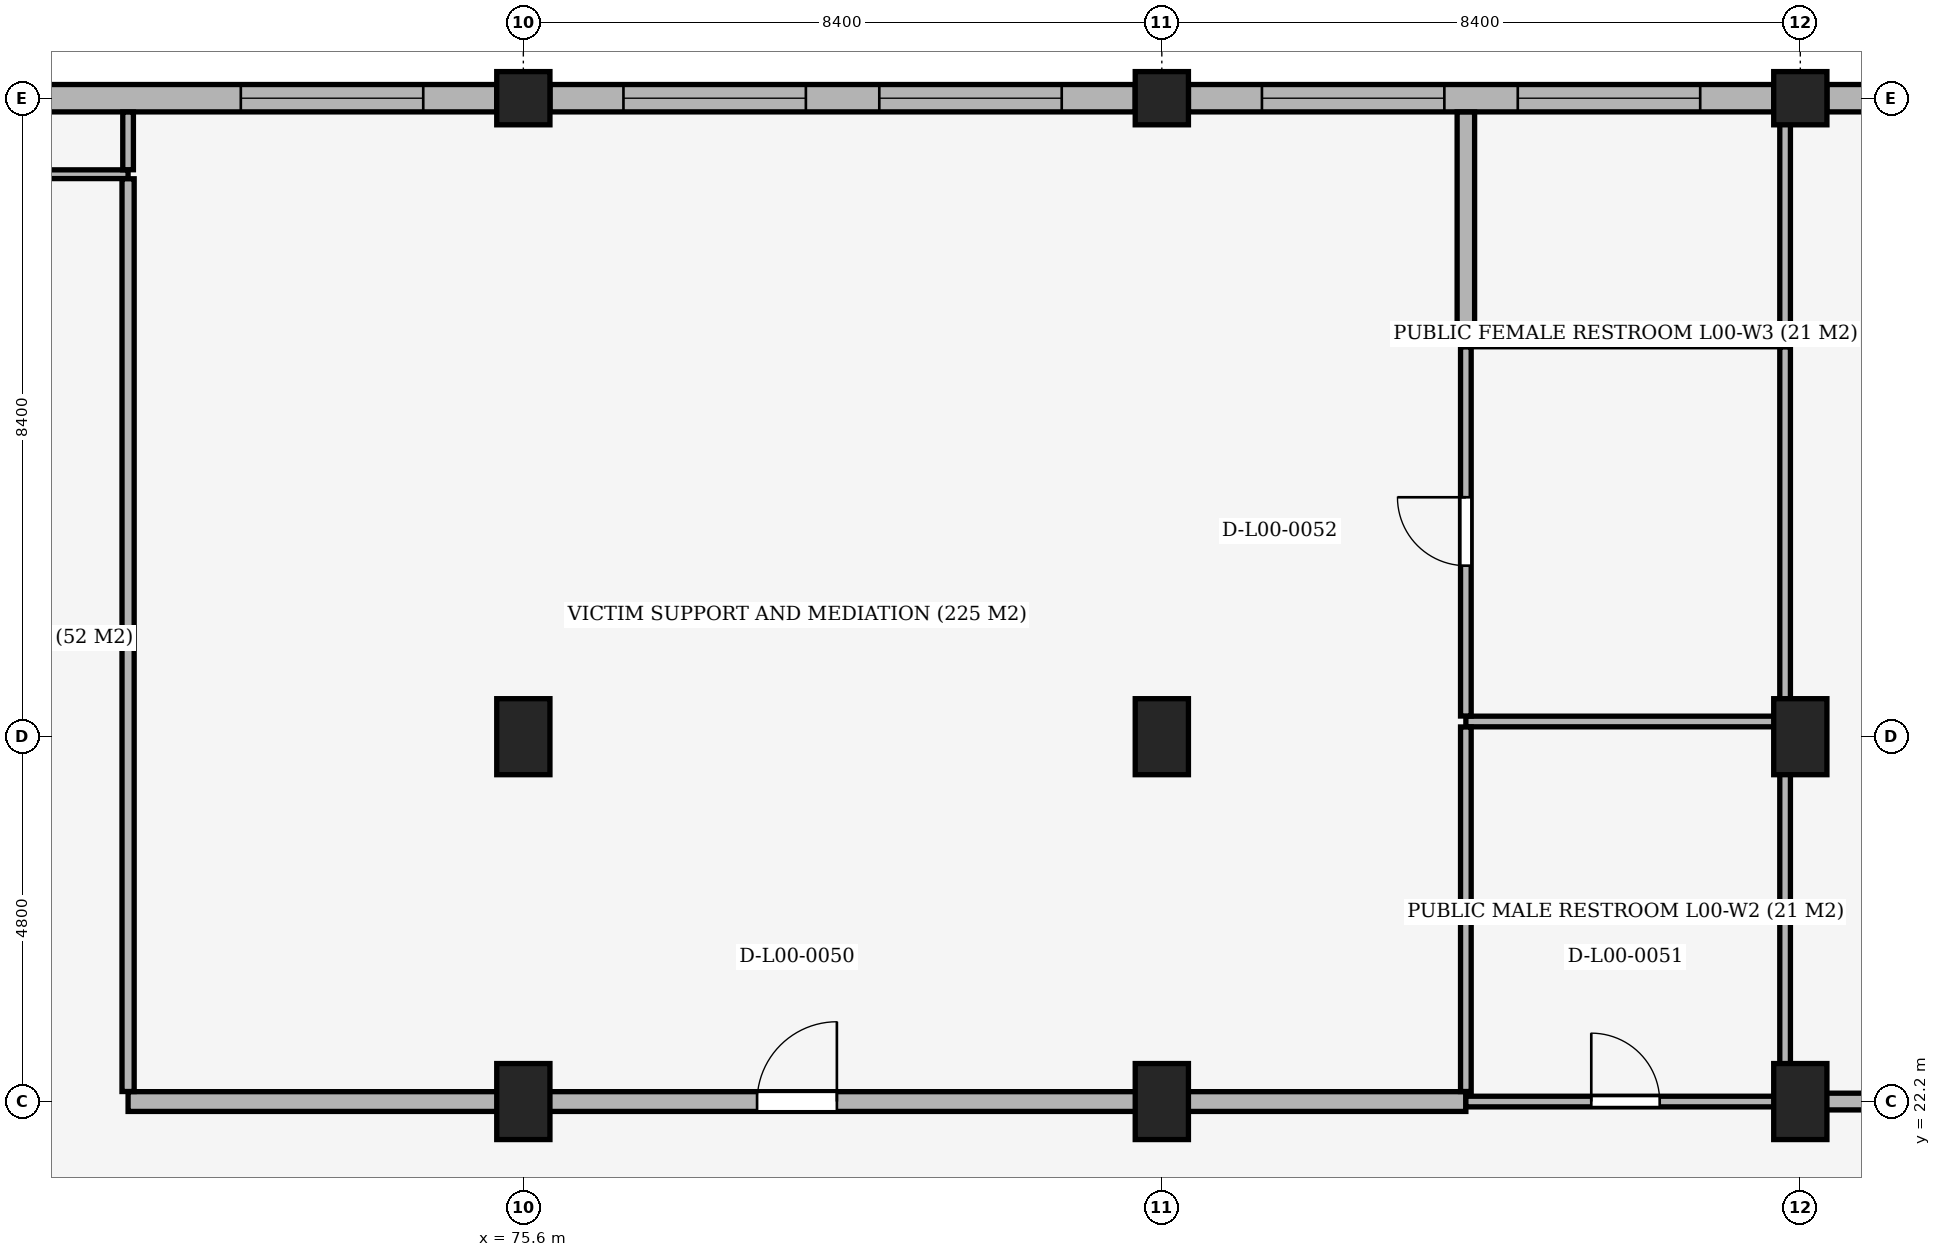
"""IFC4 building model, lengths in metres.
Left out: names, types, materials, properties, quantities, classifications, styles, units other than length and angle.
Written with IfcOpenShell. Run it as: python <this file> out.ifc"""

import sys

from ifc_helpers import new_model, si_unit, direction, frame, frame_2d, origin, origin_2d, place, context, subcontext, project, spatial, rectangle, extrude, element, fill, save


model = new_model("IFC4")
c1 = context("Model", 3, precision=1e-05, world=origin(), true_north=direction((0.0, 1.0)))
c2 = subcontext(c1, "Body", "Model", "MODEL_VIEW")
j1 = project(units=[si_unit("LENGTHUNIT", "METRE"), si_unit("PLANEANGLEUNIT", "RADIAN")], contexts=[c1])
p1 = place(None, origin())
s1 = spatial("IfcSite", under=j1, at=p1, CompositionType="ELEMENT")
p2 = place(p1, origin())
s2 = spatial("IfcBuilding", under=s1, at=p2, CompositionType="ELEMENT")
p3 = place(p2, origin())
s3 = spatial("IfcBuildingStorey", under=s2, at=p3, CompositionType="ELEMENT", Elevation=0.0)
for number, where, z_axis, x_axis in (
    (1, (75.6, 22.2, 0.0), (0.0, 0.0, 1.0), (1.0, 0.0, 0.0)),
    (2, (75.6, 27.0, 0.0), (0.0, 0.0, 1.0), (1.0, 0.0, 0.0)),
):
    element("IfcColumn", number, at=place(p3, frame(where, z_axis=z_axis, x_axis=x_axis)), inside=s3, PredefinedType="COLUMN", context=c2, shape_type="SweptSolid", body=[
        extrude(rectangle(XDim=0.7, YDim=1.0, at=origin_2d()), origin(), (0.0, 0.0, 1.0), 5.1),
    ])
p4 = place(p3, frame((75.6, 35.4, 0.0), z_axis=(0.0, 0.0, 1.0), x_axis=(1.0, 0.0, 0.0)))
e3 = element("IfcColumn", 3, at=p4, inside=s3, PredefinedType="COLUMN", context=c2, shape_type="SweptSolid", body=[
    extrude(rectangle(XDim=0.7, YDim=0.7, at=origin_2d()), origin(), (0.0, 0.0, 1.0), 5.1),
])
for number, where, z_axis, x_axis in (
    (4, (84.0, 22.2, 0.0), (0.0, 0.0, 1.0), (1.0, 0.0, 0.0)),
    (5, (84.0, 27.0, 0.0), (0.0, 0.0, 1.0), (1.0, 0.0, 0.0)),
):
    element("IfcColumn", number, at=place(p3, frame(where, z_axis=z_axis, x_axis=x_axis)), inside=s3, PredefinedType="COLUMN", context=c2, shape_type="SweptSolid", body=[
        extrude(rectangle(XDim=0.7, YDim=1.0, at=origin_2d()), origin(), (0.0, 0.0, 1.0), 5.1),
    ])
p5 = place(p3, frame((84.0, 35.4, 0.0), z_axis=(0.0, 0.0, 1.0), x_axis=(1.0, 0.0, 0.0)))
e6 = element("IfcColumn", 6, at=p5, inside=s3, PredefinedType="COLUMN", context=c2, shape_type="SweptSolid", body=[
    extrude(rectangle(XDim=0.7, YDim=0.7, at=origin_2d()), origin(), (0.0, 0.0, 1.0), 5.1),
])
for number, where, z_axis, x_axis in (
    (7, (92.4, 22.2, 0.0), (0.0, 0.0, 1.0), (1.0, 0.0, 0.0)),
    (8, (92.4, 27.0, 0.0), (0.0, 0.0, 1.0), (1.0, 0.0, 0.0)),
):
    element("IfcColumn", number, at=place(p3, frame(where, z_axis=z_axis, x_axis=x_axis)), inside=s3, PredefinedType="COLUMN", context=c2, shape_type="SweptSolid", body=[
        extrude(rectangle(XDim=0.7, YDim=1.0, at=origin_2d()), origin(), (0.0, 0.0, 1.0), 5.1),
    ])
p6 = place(p3, frame((92.4, 35.4, 0.0), z_axis=(0.0, 0.0, 1.0), x_axis=(1.0, 0.0, 0.0)))
e9 = element("IfcColumn", 9, at=p6, inside=s3, PredefinedType="COLUMN", context=c2, shape_type="SweptSolid", body=[
    extrude(rectangle(XDim=0.7, YDim=0.7, at=origin_2d()), origin(), (0.0, 0.0, 1.0), 5.1),
])
p7 = place(p3, frame((67.55, 35.4, 0.0), z_axis=(0.0, 0.0, 1.0), x_axis=(1.0, 0.0, 0.0)))
e10 = element("IfcWall", 10, at=p7, inside=s3, PredefinedType="SOLIDWALL", context=c2, shape_type="SweptSolid", body=[
    extrude(rectangle(XDim=7.7, YDim=0.36, at=frame_2d((3.85, 0.0))), origin(), (0.0, 0.0, 1.0), 4.07),
])
p8 = place(p7, frame((4.333, 0.0, 0.85)))
e11 = element("IfcOpeningElement", 11, at=p8, cuts=e10, PredefinedType="OPENING", context=c2, shape_type="SweptSolid", body=[
    extrude(rectangle(XDim=2.4, YDim=2.4, at=frame_2d((1.2, 1.2))), frame((0.0, 0.195, 0.0), z_axis=(0.0, -1.0, 0.0), x_axis=(1.0, 0.0, 0.0)), (0.0, 0.0, 1.0), 0.39),
])
p9 = place(p3, frame((75.95, 35.4, 0.0), z_axis=(0.0, 0.0, 1.0), x_axis=(1.0, 0.0, 0.0)))
e12 = element("IfcWall", 12, at=p9, inside=s3, PredefinedType="SOLIDWALL", context=c2, shape_type="SweptSolid", body=[
    extrude(rectangle(XDim=7.7, YDim=0.36, at=frame_2d((3.85, 0.0))), origin(), (0.0, 0.0, 1.0), 4.07),
])
p10 = place(p9, frame((0.967, 0.0, 0.85)))
e13 = element("IfcOpeningElement", 13, at=p10, cuts=e12, PredefinedType="OPENING", context=c2, shape_type="SweptSolid", body=[
    extrude(rectangle(XDim=2.4, YDim=2.4, at=frame_2d((1.2, 1.2))), frame((0.0, 0.195, 0.0), z_axis=(0.0, -1.0, 0.0), x_axis=(1.0, 0.0, 0.0)), (0.0, 0.0, 1.0), 0.39),
])
p11 = place(p9, frame((4.333, 0.0, 0.85)))
e14 = element("IfcOpeningElement", 14, at=p11, cuts=e12, PredefinedType="OPENING", context=c2, shape_type="SweptSolid", body=[
    extrude(rectangle(XDim=2.4, YDim=2.4, at=frame_2d((1.2, 1.2))), frame((0.0, 0.195, 0.0), z_axis=(0.0, -1.0, 0.0), x_axis=(1.0, 0.0, 0.0)), (0.0, 0.0, 1.0), 0.39),
])
p12 = place(p3, frame((84.35, 35.4, 0.0), z_axis=(0.0, 0.0, 1.0), x_axis=(1.0, 0.0, 0.0)))
e15 = element("IfcWall", 15, at=p12, inside=s3, PredefinedType="SOLIDWALL", context=c2, shape_type="SweptSolid", body=[
    extrude(rectangle(XDim=7.7, YDim=0.36, at=frame_2d((3.85, 0.0))), origin(), (0.0, 0.0, 1.0), 4.07),
])
p13 = place(p12, frame((0.967, 0.0, 0.85)))
e16 = element("IfcOpeningElement", 16, at=p13, cuts=e15, PredefinedType="OPENING", context=c2, shape_type="SweptSolid", body=[
    extrude(rectangle(XDim=2.4, YDim=2.4, at=frame_2d((1.2, 1.2))), frame((0.0, 0.195, 0.0), z_axis=(0.0, -1.0, 0.0), x_axis=(1.0, 0.0, 0.0)), (0.0, 0.0, 1.0), 0.39),
])
p14 = place(p12, frame((4.333, 0.0, 0.85)))
e17 = element("IfcOpeningElement", 17, at=p14, cuts=e15, PredefinedType="OPENING", context=c2, shape_type="SweptSolid", body=[
    extrude(rectangle(XDim=2.4, YDim=2.4, at=frame_2d((1.2, 1.2))), frame((0.0, 0.195, 0.0), z_axis=(0.0, -1.0, 0.0), x_axis=(1.0, 0.0, 0.0)), (0.0, 0.0, 1.0), 0.39),
])
p15 = place(p3, frame((92.75, 35.4, 0.0), z_axis=(0.0, 0.0, 1.0), x_axis=(1.0, 0.0, 0.0)))
e18 = element("IfcWall", 18, at=p15, inside=s3, PredefinedType="SOLIDWALL", context=c2, shape_type="SweptSolid", body=[
    extrude(rectangle(XDim=7.7, YDim=0.36, at=frame_2d((3.85, 0.0))), origin(), (0.0, 0.0, 1.0), 4.07),
])
p16 = place(p15, frame((0.967, 0.0, 0.85)))
e19 = element("IfcOpeningElement", 19, at=p16, cuts=e18, PredefinedType="OPENING", context=c2, shape_type="SweptSolid", body=[
    extrude(rectangle(XDim=2.4, YDim=2.4, at=frame_2d((1.2, 1.2))), frame((0.0, 0.195, 0.0), z_axis=(0.0, -1.0, 0.0), x_axis=(1.0, 0.0, 0.0)), (0.0, 0.0, 1.0), 0.39),
])
p17 = place(p15, frame((4.333, 0.0, 0.85)))
e20 = element("IfcOpeningElement", 20, at=p17, cuts=e18, PredefinedType="OPENING", context=c2, shape_type="SweptSolid", body=[
    extrude(rectangle(XDim=2.4, YDim=2.4, at=frame_2d((1.2, 1.2))), frame((0.0, 0.195, 0.0), z_axis=(0.0, -1.0, 0.0), x_axis=(1.0, 0.0, 0.0)), (0.0, 0.0, 1.0), 0.39),
])
p18 = place(p3, frame((70.4, 22.2, 0.0), z_axis=(0.0, 0.0, 1.0), x_axis=(1.0, 0.0, 0.0)))
e21 = element("IfcWall", 21, at=p18, inside=s3, PredefinedType="PARTITIONING", context=c2, shape_type="SweptSolid", body=[
    extrude(rectangle(XDim=17.6, YDim=0.26, at=frame_2d((8.8, 0.0))), origin(), (0.0, 0.0, 1.0), 4.07),
])
p19 = place(p18, frame((8.275, 0.0, 0.0)))
e22 = element("IfcOpeningElement", 22, at=p19, cuts=e21, PredefinedType="OPENING", context=c2, shape_type="SweptSolid", body=[
    extrude(rectangle(XDim=1.05, YDim=2.1, at=frame_2d((0.525, 1.05))), frame((0.0, 0.145, 0.0), z_axis=(0.0, -1.0, 0.0), x_axis=(1.0, 0.0, 0.0)), (0.0, 0.0, 1.0), 0.29),
])
p20 = place(p3, frame((88.0, 22.2, 0.0), z_axis=(0.0, 0.0, 1.0), x_axis=(1.0, 0.0, 0.0)))
e23 = element("IfcWall", 23, at=p20, inside=s3, PredefinedType="PARTITIONING", context=c2, shape_type="SweptSolid", body=[
    extrude(rectangle(XDim=4.2, YDim=0.14, at=frame_2d((2.1, 0.0))), origin(), (0.0, 0.0, 1.0), 4.07),
])
p21 = place(p20, frame((1.65, 0.0, 0.0)))
e24 = element("IfcOpeningElement", 24, at=p21, cuts=e23, PredefinedType="OPENING", context=c2, shape_type="SweptSolid", body=[
    extrude(rectangle(XDim=0.9, YDim=2.1, at=frame_2d((0.45, 1.05))), frame((0.0, 0.085, 0.0), z_axis=(0.0, -1.0, 0.0), x_axis=(1.0, 0.0, 0.0)), (0.0, 0.0, 1.0), 0.17),
])
p22 = place(p3, frame((92.2, 22.2, 0.0), z_axis=(0.0, 0.0, 1.0), x_axis=(1.0, 0.0, 0.0)))
e25 = element("IfcWall", 25, at=p22, inside=s3, PredefinedType="PARTITIONING", context=c2, shape_type="SweptSolid", body=[
    extrude(rectangle(XDim=16.6, YDim=0.22, at=frame_2d((8.3, 0.0))), origin(), (0.0, 0.0, 1.0), 4.07),
])
p23 = place(p22, frame((6.45, 0.0, 0.0)))
e26 = element("IfcOpeningElement", 26, at=p23, cuts=e25, PredefinedType="OPENING", context=c2, shape_type="SweptSolid", body=[
    extrude(rectangle(XDim=0.9, YDim=2.2, at=frame_2d((0.45, 1.1))), frame((0.0, 0.125, 0.0), z_axis=(0.0, -1.0, 0.0), x_axis=(1.0, 0.0, 0.0)), (0.0, 0.0, 1.0), 0.25),
])
p24 = place(p3, frame((88.0, 27.2, 0.0), z_axis=(0.0, 0.0, 1.0), x_axis=(1.0, 0.0, 0.0)))
e27 = element("IfcWall", 27, at=p24, inside=s3, PredefinedType="PARTITIONING", context=c2, shape_type="SweptSolid", body=[
    extrude(rectangle(XDim=4.2, YDim=0.14, at=frame_2d((2.1, 0.0))), origin(), (0.0, 0.0, 1.0), 4.07),
])
p25 = place(p3, frame((88.0, 32.2, 0.0), z_axis=(0.0, 0.0, 1.0), x_axis=(1.0, 0.0, 0.0)))
e28 = element("IfcWall", 28, at=p25, inside=s3, PredefinedType="PARTITIONING", context=c2, shape_type="SweptSolid", body=[
    extrude(rectangle(XDim=4.2, YDim=0.14, at=frame_2d((2.1, 0.0))), origin(), (0.0, 0.0, 1.0), 4.02),
])
p26 = place(p3, frame((66.1, 34.4, 0.0), z_axis=(0.0, 0.0, 1.0), x_axis=(1.0, 0.0, 0.0)))
e29 = element("IfcWall", 29, at=p26, inside=s3, PredefinedType="PARTITIONING", context=c2, shape_type="SweptSolid", body=[
    extrude(rectangle(XDim=4.3, YDim=0.115, at=frame_2d((2.15, 0.0))), origin(), (0.0, 0.0, 1.0), 4.02),
])
p27 = place(p3, frame((70.4, 22.332, 0.0), z_axis=(0.0, 0.0, 1.0), x_axis=(0.0, 1.0, 0.0)))
e30 = element("IfcWall", 30, at=p27, inside=s3, PredefinedType="PARTITIONING", context=c2, shape_type="SweptSolid", body=[
    extrude(rectangle(XDim=12.008, YDim=0.16, at=frame_2d((6.004, 0.0))), origin(), (0.0, 0.0, 1.0), 4.07),
])
p28 = place(p3, frame((70.4, 34.459, 0.0), z_axis=(0.0, 0.0, 1.0), x_axis=(0.0, 1.0, 0.0)))
e31 = element("IfcWall", 31, at=p28, inside=s3, PredefinedType="PARTITIONING", context=c2, shape_type="SweptSolid", body=[
    extrude(rectangle(XDim=0.759, YDim=0.14, at=frame_2d((0.379, 0.0))), origin(), (0.0, 0.0, 1.0), 4.07),
])
p29 = place(p3, frame((88.0, 32.272, 0.0), z_axis=(0.0, 0.0, 1.0), x_axis=(0.0, 1.0, 0.0)))
e32 = element("IfcWall", 32, at=p29, inside=s3, PredefinedType="SOLIDWALL", context=c2, shape_type="SweptSolid", body=[
    extrude(rectangle(XDim=2.946, YDim=0.23, at=frame_2d((1.473, 0.0))), origin(), (0.0, 0.0, 1.0), 4.07),
])
p30 = place(p3, frame((88.0, 22.332, 0.0), z_axis=(0.0, 0.0, 1.0), x_axis=(0.0, 1.0, 0.0)))
e33 = element("IfcWall", 33, at=p30, inside=s3, PredefinedType="PARTITIONING", context=c2, shape_type="SweptSolid", body=[
    extrude(rectangle(XDim=4.796, YDim=0.14, at=frame_2d((2.398, 0.0))), origin(), (0.0, 0.0, 1.0), 4.07),
])
p31 = place(p3, frame((88.0, 27.272, 0.0), z_axis=(0.0, 0.0, 1.0), x_axis=(0.0, 1.0, 0.0)))
e34 = element("IfcWall", 34, at=p31, inside=s3, PredefinedType="PARTITIONING", context=c2, shape_type="SweptSolid", body=[
    extrude(rectangle(XDim=4.856, YDim=0.14, at=frame_2d((2.428, 0.0))), origin(), (0.0, 0.0, 1.0), 4.07),
])
p32 = place(p31, frame((1.978, 0.0, 0.0)))
e35 = element("IfcOpeningElement", 35, at=p32, cuts=e34, PredefinedType="OPENING", context=c2, shape_type="SweptSolid", body=[
    extrude(rectangle(XDim=0.9, YDim=2.1, at=frame_2d((0.45, 1.05))), frame((0.0, 0.085, 0.0), z_axis=(0.0, -1.0, 0.0), x_axis=(1.0, 0.0, 0.0)), (0.0, 0.0, 1.0), 0.17),
])
p33 = place(p3, frame((92.2, 22.312, 0.0), z_axis=(0.0, 0.0, 1.0), x_axis=(0.0, 1.0, 0.0)))
e36 = element("IfcWall", 36, at=p33, inside=s3, PredefinedType="PARTITIONING", context=c2, shape_type="SweptSolid", body=[
    extrude(rectangle(XDim=4.816, YDim=0.14, at=frame_2d((2.408, 0.0))), origin(), (0.0, 0.0, 1.0), 4.07),
])
p34 = place(p3, frame((92.2, 27.272, 0.0), z_axis=(0.0, 0.0, 1.0), x_axis=(0.0, 1.0, 0.0)))
e37 = element("IfcWall", 37, at=p34, inside=s3, PredefinedType="PARTITIONING", context=c2, shape_type="SweptSolid", body=[
    extrude(rectangle(XDim=4.856, YDim=0.14, at=frame_2d((2.428, 0.0))), origin(), (0.0, 0.0, 1.0), 4.02),
])
p35 = place(p3, frame((92.2, 32.272, 0.0), z_axis=(0.0, 0.0, 1.0), x_axis=(0.0, 1.0, 0.0)))
e38 = element("IfcWall", 38, at=p35, inside=s3, PredefinedType="PARTITIONING", context=c2, shape_type="SweptSolid", body=[
    extrude(rectangle(XDim=2.98, YDim=0.14, at=frame_2d((1.49, 0.0))), origin(), (0.0, 0.0, 1.0), 4.02),
])
p36 = place(p8, origin())
e39 = element("IfcWindow", 39, at=p36, inside=s3, PartitioningType="SINGLE_PANEL", PredefinedType="WINDOW", context=c2, shape_type="SweptSolid", body=[
    extrude(rectangle(XDim=2.4, YDim=2.4, at=frame_2d((1.2, 1.2))), frame((0.0, 0.03, 0.0), z_axis=(0.0, -1.0, 0.0), x_axis=(1.0, 0.0, 0.0)), (0.0, 0.0, 1.0), 0.06),
])
fill(e11, e39)
p37 = place(p10, origin())
e40 = element("IfcWindow", 40, at=p37, inside=s3, PartitioningType="SINGLE_PANEL", PredefinedType="WINDOW", context=c2, shape_type="SweptSolid", body=[
    extrude(rectangle(XDim=2.4, YDim=2.4, at=frame_2d((1.2, 1.2))), frame((0.0, 0.03, 0.0), z_axis=(0.0, -1.0, 0.0), x_axis=(1.0, 0.0, 0.0)), (0.0, 0.0, 1.0), 0.06),
])
fill(e13, e40)
p38 = place(p11, origin())
e41 = element("IfcWindow", 41, at=p38, inside=s3, PartitioningType="SINGLE_PANEL", PredefinedType="WINDOW", context=c2, shape_type="SweptSolid", body=[
    extrude(rectangle(XDim=2.4, YDim=2.4, at=frame_2d((1.2, 1.2))), frame((0.0, 0.03, 0.0), z_axis=(0.0, -1.0, 0.0), x_axis=(1.0, 0.0, 0.0)), (0.0, 0.0, 1.0), 0.06),
])
fill(e14, e41)
p39 = place(p13, origin())
e42 = element("IfcWindow", 42, at=p39, inside=s3, PartitioningType="SINGLE_PANEL", PredefinedType="WINDOW", context=c2, shape_type="SweptSolid", body=[
    extrude(rectangle(XDim=2.4, YDim=2.4, at=frame_2d((1.2, 1.2))), frame((0.0, 0.03, 0.0), z_axis=(0.0, -1.0, 0.0), x_axis=(1.0, 0.0, 0.0)), (0.0, 0.0, 1.0), 0.06),
])
fill(e16, e42)
p40 = place(p14, origin())
e43 = element("IfcWindow", 43, at=p40, inside=s3, PartitioningType="SINGLE_PANEL", PredefinedType="WINDOW", context=c2, shape_type="SweptSolid", body=[
    extrude(rectangle(XDim=2.4, YDim=2.4, at=frame_2d((1.2, 1.2))), frame((0.0, 0.03, 0.0), z_axis=(0.0, -1.0, 0.0), x_axis=(1.0, 0.0, 0.0)), (0.0, 0.0, 1.0), 0.06),
])
fill(e17, e43)
p41 = place(p19, origin())
e44 = element("IfcDoor", 44, at=p41, inside=s3, OperationType="SINGLE_SWING_RIGHT", PredefinedType="DOOR", context=c2, shape_type="SweptSolid", body=[
    extrude(rectangle(XDim=1.05, YDim=2.1, at=frame_2d((0.525, 1.05))), frame((0.0, 0.025, 0.0), z_axis=(0.0, -1.0, 0.0), x_axis=(1.0, 0.0, 0.0)), (0.0, 0.0, 1.0), 0.05),
])
fill(e22, e44)
p42 = place(p21, origin())
e45 = element("IfcDoor", 45, at=p42, inside=s3, OperationType="SINGLE_SWING_LEFT", PredefinedType="DOOR", context=c2, shape_type="SweptSolid", body=[
    extrude(rectangle(XDim=0.9, YDim=2.1, at=frame_2d((0.45, 1.05))), frame((0.0, 0.025, 0.0), z_axis=(0.0, -1.0, 0.0), x_axis=(1.0, 0.0, 0.0)), (0.0, 0.0, 1.0), 0.05),
])
fill(e24, e45)
p43 = place(p32, origin())
e46 = element("IfcDoor", 46, at=p43, inside=s3, OperationType="SINGLE_SWING_RIGHT", PredefinedType="DOOR", context=c2, shape_type="SweptSolid", body=[
    extrude(rectangle(XDim=0.9, YDim=2.1, at=frame_2d((0.45, 1.05))), frame((0.0, 0.025, 0.0), z_axis=(0.0, -1.0, 0.0), x_axis=(1.0, 0.0, 0.0)), (0.0, 0.0, 1.0), 0.05),
])
fill(e35, e46)
save(model, sys.argv[1])
